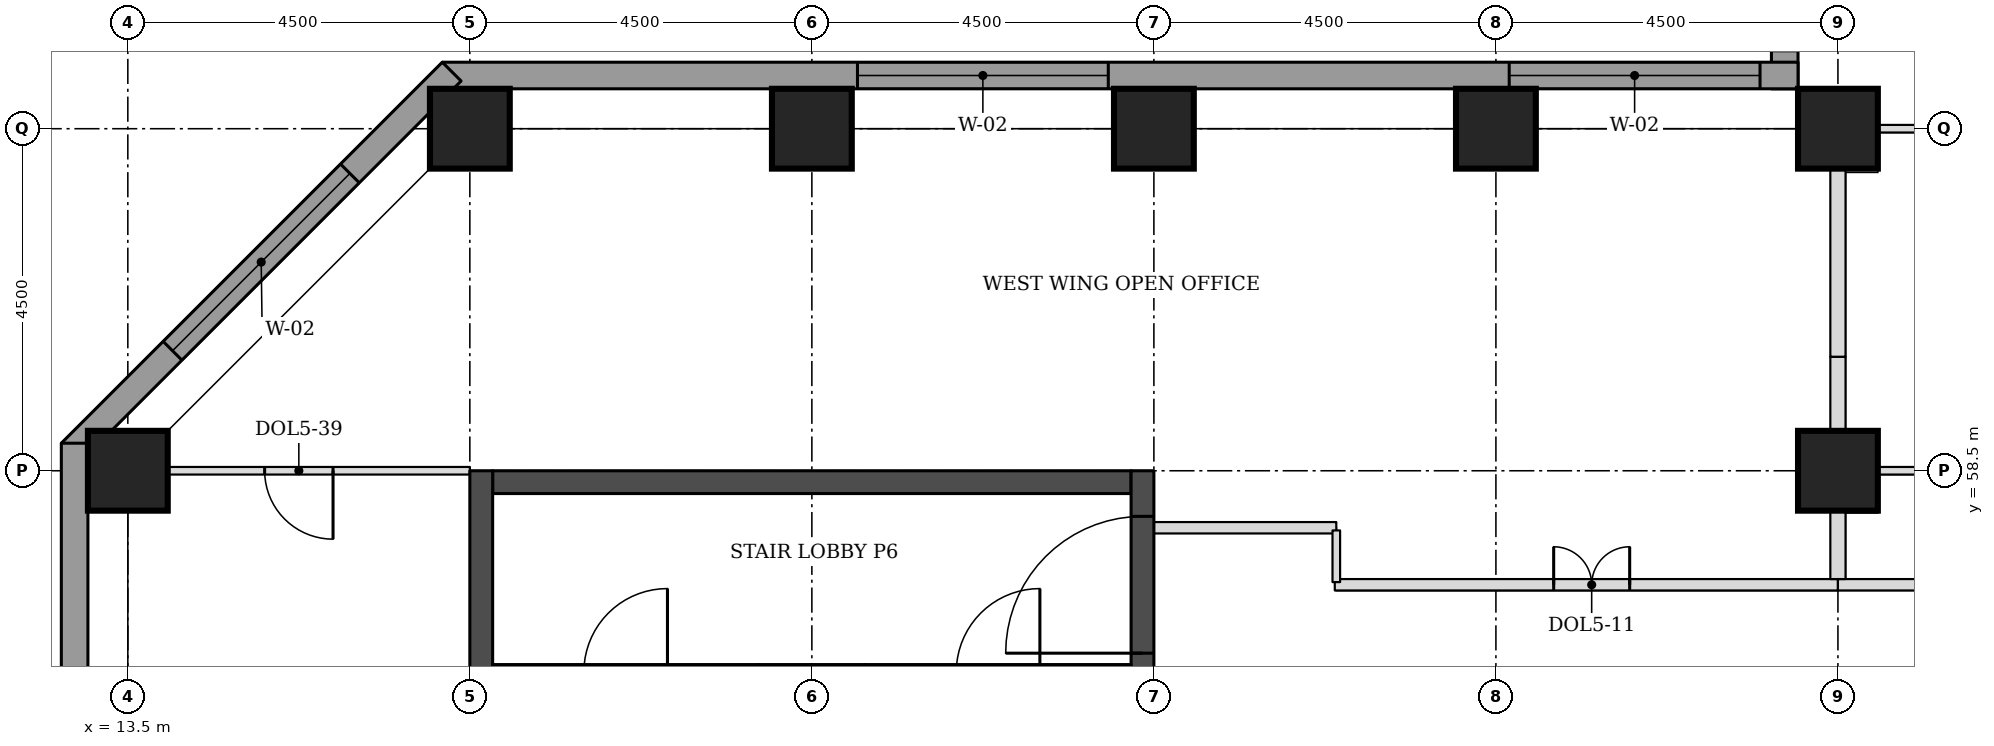
"""IFC4 building model, lengths in metres.
Left out: names, types, materials, properties, quantities, classifications, styles, units other than length and angle.
Written with IfcOpenShell. Run it as: python <this file> out.ifc"""

import sys

from ifc_helpers import new_model, si_unit, direction, frame, frame_2d, origin, origin_2d, place, context, subcontext, project, spatial, rectangle, extrude, element, fill, save


model = new_model("IFC4")
c1 = context("Model", 3, precision=1e-05, world=origin(), true_north=direction((0.0, 1.0)))
c2 = subcontext(c1, "Body", "Model", "MODEL_VIEW")
j1 = project(units=[si_unit("LENGTHUNIT", "METRE"), si_unit("PLANEANGLEUNIT", "RADIAN")], contexts=[c1])
p1 = place(None, origin())
s1 = spatial("IfcSite", under=j1, at=p1, CompositionType="ELEMENT")
p2 = place(p1, origin())
s2 = spatial("IfcBuilding", under=s1, at=p2, CompositionType="ELEMENT")
p3 = place(p2, frame((0.0, 0.0, 112.2)))
s3 = spatial("IfcBuildingStorey", under=s2, at=p3, CompositionType="ELEMENT", Elevation=112.2)
for number, where, z_axis, x_axis in (
    (1, (13.5, 58.5, 0.0), (0.0, 0.0, 1.0), (1.0, 0.0, 0.0)),
    (2, (36.0, 58.5, 0.0), (0.0, 0.0, 1.0), (1.0, 0.0, 0.0)),
    (3, (18.0, 63.0, 0.0), (0.0, 0.0, 1.0), (1.0, 0.0, 0.0)),
    (4, (22.5, 63.0, 0.0), (0.0, 0.0, 1.0), (1.0, 0.0, 0.0)),
    (5, (27.0, 63.0, 0.0), (0.0, 0.0, 1.0), (1.0, 0.0, 0.0)),
    (6, (31.5, 63.0, 0.0), (0.0, 0.0, 1.0), (1.0, 0.0, 0.0)),
    (7, (36.0, 63.0, 0.0), (0.0, 0.0, 1.0), (1.0, 0.0, 0.0)),
):
    element("IfcColumn", number, at=place(p3, frame(where, z_axis=z_axis, x_axis=x_axis)), inside=s3, PredefinedType="COLUMN", context=c2, shape_type="SweptSolid", body=[
        extrude(rectangle(XDim=1.05, YDim=1.05, at=origin_2d()), origin(), (0.0, 0.0, 1.0), 3.7),
    ])
p4 = place(p3, frame((18.3, 58.35, 0.0), z_axis=(0.0, 0.0, 1.0), x_axis=(1.0, 0.0, 0.0)))
e8 = element("IfcWall", 8, at=p4, inside=s3, PredefinedType="SHEAR", context=c2, shape_type="SweptSolid", body=[
    extrude(rectangle(XDim=8.4, YDim=0.3, at=frame_2d((4.2, 0.0))), origin(), (0.0, 0.0, 1.0), 3.7),
])
p5 = place(p3, frame((18.15, 49.5, 0.0), z_axis=(0.0, 0.0, 1.0), x_axis=(0.0, 1.0, 0.0)))
e9 = element("IfcWall", 9, at=p5, inside=s3, PredefinedType="SHEAR", context=c2, shape_type="SweptSolid", body=[
    extrude(rectangle(XDim=9.0, YDim=0.3, at=frame_2d((4.5, 0.0))), origin(), (0.0, 0.0, 1.0), 3.7),
])
p6 = place(p3, frame((26.85, 49.5, 0.0), z_axis=(0.0, 0.0, 1.0), x_axis=(0.0, 1.0, 0.0)))
e10 = element("IfcWall", 10, at=p6, inside=s3, PredefinedType="SHEAR", context=c2, shape_type="SweptSolid", body=[
    extrude(rectangle(XDim=9.0, YDim=0.3, at=frame_2d((4.5, 0.0))), origin(), (0.0, 0.0, 1.0), 3.7),
])
p7 = place(p6, frame((6.6, 0.0, 0.0)))
e11 = element("IfcOpeningElement", 11, at=p7, cuts=e10, PredefinedType="OPENING", context=c2, shape_type="SweptSolid", body=[
    extrude(rectangle(XDim=1.8, YDim=2.1, at=frame_2d((0.9, 1.05))), frame((0.0, 0.16, 0.0), z_axis=(0.0, -1.0, 0.0), x_axis=(1.0, 0.0, 0.0)), (0.0, 0.0, 1.0), 0.32),
])
p8 = place(p3, frame((35.3, 76.862, 0.0), z_axis=(0.0, 0.0, 1.0), x_axis=(0.0, -1.0, 0.0)))
e12 = element("IfcWall", 12, at=p8, inside=s3, PredefinedType="STANDARD", context=c2, shape_type="SweptSolid", body=[
    extrude(rectangle(XDim=13.337, YDim=0.35, at=frame_2d((6.669, 0.0))), origin(), (0.0, 0.0, 1.0), 3.525),
])
p9 = place(p8, frame((9.537, 0.0, 0.9)))
e13 = element("IfcOpeningElement", 13, at=p9, cuts=e12, PredefinedType="OPENING", context=c2, shape_type="SweptSolid", body=[
    extrude(rectangle(XDim=3.3, YDim=1.9, at=frame_2d((1.65, 0.95))), frame((0.0, 0.185, 0.0), z_axis=(0.0, -1.0, 0.0), x_axis=(1.0, 0.0, 0.0)), (0.0, 0.0, 1.0), 0.37),
])
p10 = place(p3, frame((35.475, 63.7, 0.0), z_axis=(0.0, 0.0, 1.0), x_axis=(-1.0, 0.0, 0.0)))
e14 = element("IfcWall", 14, at=p10, inside=s3, PredefinedType="STANDARD", context=c2, shape_type="SweptSolid", body=[
    extrude(rectangle(XDim=17.837, YDim=0.35, at=frame_2d((8.919, 0.0))), origin(), (0.0, 0.0, 1.0), 3.525),
])
p11 = place(p10, frame((0.5, 0.0, 0.9)))
e15 = element("IfcOpeningElement", 15, at=p11, cuts=e14, PredefinedType="OPENING", context=c2, shape_type="SweptSolid", body=[
    extrude(rectangle(XDim=3.3, YDim=1.9, at=frame_2d((1.65, 0.95))), frame((0.0, 0.185, 0.0), z_axis=(0.0, -1.0, 0.0), x_axis=(1.0, 0.0, 0.0)), (0.0, 0.0, 1.0), 0.37),
])
p12 = place(p10, frame((9.075, 0.0, 0.9)))
e16 = element("IfcOpeningElement", 16, at=p12, cuts=e14, PredefinedType="OPENING", context=c2, shape_type="SweptSolid", body=[
    extrude(rectangle(XDim=3.3, YDim=1.9, at=frame_2d((1.65, 0.95))), frame((0.0, 0.185, 0.0), z_axis=(0.0, -1.0, 0.0), x_axis=(1.0, 0.0, 0.0)), (0.0, 0.0, 1.0), 0.37),
])
p13 = place(p3, frame((17.761, 63.751, 0.0), z_axis=(0.0, 0.0, 1.0), x_axis=(-0.707106781187, -0.707106781187, 0.0)))
e17 = element("IfcWall", 17, at=p13, inside=s3, PredefinedType="STANDARD", context=c2, shape_type="SweptSolid", body=[
    extrude(rectangle(XDim=7.089, YDim=0.35, at=frame_2d((3.544, 0.0))), origin(), (0.0, 0.0, 1.0), 3.525),
])
p14 = place(p13, frame((1.894, 0.0, 0.9)))
e18 = element("IfcOpeningElement", 18, at=p14, cuts=e17, PredefinedType="OPENING", context=c2, shape_type="SweptSolid", body=[
    extrude(rectangle(XDim=3.3, YDim=1.9, at=frame_2d((1.65, 0.95))), frame((0.0, 0.185, 0.0), z_axis=(0.0, -1.0, 0.0), x_axis=(1.0, 0.0, 0.0)), (0.0, 0.0, 1.0), 0.37),
])
p15 = place(p3, frame((12.8, 58.862, 0.0), z_axis=(0.0, 0.0, 1.0), x_axis=(0.0, -1.0, 0.0)))
e19 = element("IfcWall", 19, at=p15, inside=s3, PredefinedType="STANDARD", context=c2, shape_type="SweptSolid", body=[
    extrude(rectangle(XDim=14.225, YDim=0.35, at=frame_2d((7.112, 0.0))), origin(), (0.0, 0.0, 1.0), 3.525),
])
p16 = place(p15, frame((5.462, 0.0, 0.9)))
e20 = element("IfcOpeningElement", 20, at=p16, cuts=e19, PredefinedType="OPENING", context=c2, shape_type="SweptSolid", body=[
    extrude(rectangle(XDim=3.3, YDim=1.9, at=frame_2d((1.65, 0.95))), frame((0.0, 0.185, 0.0), z_axis=(0.0, -1.0, 0.0), x_axis=(1.0, 0.0, 0.0)), (0.0, 0.0, 1.0), 0.37),
])
p17 = place(p3, frame((29.38, 57.0, 0.0), z_axis=(0.0, 0.0, 1.0), x_axis=(1.0, 0.0, 0.0)))
e21 = element("IfcWall", 21, at=p17, inside=s3, PredefinedType="PARTITIONING", context=c2, shape_type="SweptSolid", body=[
    extrude(rectangle(XDim=6.62, YDim=0.15, at=frame_2d((3.31, 0.0))), origin(), (0.0, 0.0, 1.0), 3.55),
])
p18 = place(p17, frame((2.88, 0.0, 0.0)))
e22 = element("IfcOpeningElement", 22, at=p18, cuts=e21, PredefinedType="OPENING", context=c2, shape_type="SweptSolid", body=[
    extrude(rectangle(XDim=1.0, YDim=2.1, at=frame_2d((0.5, 1.05))), frame((0.0, 0.085, 0.0), z_axis=(0.0, -1.0, 0.0), x_axis=(1.0, 0.0, 0.0)), (0.0, 0.0, 1.0), 0.17),
])
p19 = place(p3, frame((36.0, 57.0, 0.0), z_axis=(0.0, 0.0, 1.0), x_axis=(1.0, 0.0, 0.0)))
e23 = element("IfcWall", 23, at=p19, inside=s3, PredefinedType="PARTITIONING", context=c2, shape_type="SweptSolid", body=[
    extrude(rectangle(XDim=6.075, YDim=0.15, at=frame_2d((3.038, 0.0))), origin(), (0.0, 0.0, 1.0), 3.55),
])
p20 = place(p19, frame((2.55, 0.0, 0.0)))
e24 = element("IfcOpeningElement", 24, at=p20, cuts=e23, PredefinedType="OPENING", context=c2, shape_type="SweptSolid", body=[
    extrude(rectangle(XDim=1.0, YDim=2.1, at=frame_2d((0.5, 1.05))), frame((0.0, 0.085, 0.0), z_axis=(0.0, -1.0, 0.0), x_axis=(1.0, 0.0, 0.0)), (0.0, 0.0, 1.0), 0.17),
])
p21 = place(p3, frame((36.525, 58.5, 0.0), z_axis=(0.0, 0.0, 1.0), x_axis=(1.0, 0.0, 0.0)))
e25 = element("IfcWall", 25, at=p21, inside=s3, PredefinedType="PARTITIONING", context=c2, shape_type="SweptSolid", body=[
    extrude(rectangle(XDim=2.525, YDim=0.1, at=frame_2d((1.263, 0.0))), origin(), (0.0, 0.0, 1.0), 3.55),
])
p22 = place(p21, frame((0.8, 0.0, 0.0)))
e26 = element("IfcOpeningElement", 26, at=p22, cuts=e25, PredefinedType="OPENING", context=c2, shape_type="SweptSolid", body=[
    extrude(rectangle(XDim=0.9, YDim=2.1, at=frame_2d((0.45, 1.05))), frame((0.0, 0.06, 0.0), z_axis=(0.0, -1.0, 0.0), x_axis=(1.0, 0.0, 0.0)), (0.0, 0.0, 1.0), 0.12),
])
p23 = place(p3, frame((36.525, 63.0, 0.0), z_axis=(0.0, 0.0, 1.0), x_axis=(1.0, 0.0, 0.0)))
e27 = element("IfcWall", 27, at=p23, inside=s3, PredefinedType="PARTITIONING", context=c2, shape_type="SweptSolid", body=[
    extrude(rectangle(XDim=2.425, YDim=0.1, at=frame_2d((1.212, 0.0))), origin(), (0.0, 0.0, 1.0), 3.55),
])
p24 = place(p3, frame((36.0, 57.075, 0.0), z_axis=(0.0, 0.0, 1.0), x_axis=(0.0, 1.0, 0.0)))
e28 = element("IfcWall", 28, at=p24, inside=s3, PredefinedType="PARTITIONING", context=c2, shape_type="SweptSolid", body=[
    extrude(rectangle(XDim=0.9, YDim=0.2, at=frame_2d((0.45, 0.0))), origin(), (0.0, 0.0, 1.0), 2.8),
])
p25 = place(p3, frame((36.0, 58.995, 0.0), z_axis=(0.0, 0.0, 1.0), x_axis=(0.0, 1.0, 0.0)))
e29 = element("IfcWall", 29, at=p25, inside=s3, PredefinedType="PARTITIONING", context=c2, shape_type="SweptSolid", body=[
    extrude(rectangle(XDim=1.005, YDim=0.2, at=frame_2d((0.502, 0.0))), origin(), (0.0, 0.0, 1.0), 2.8),
])
p26 = place(p3, frame((36.0, 60.0, 0.0), z_axis=(0.0, 0.0, 1.0), x_axis=(0.0, 1.0, 0.0)))
e30 = element("IfcWall", 30, at=p26, inside=s3, PredefinedType="PARTITIONING", context=c2, shape_type="SweptSolid", body=[
    extrude(rectangle(XDim=2.475, YDim=0.2, at=frame_2d((1.238, 0.0))), origin(), (0.0, 0.0, 1.0), 2.8),
])
p27 = place(p3, frame((13.5, 58.5, 0.0), z_axis=(0.0, 0.0, 1.0), x_axis=(1.0, 0.0, 0.0)))
e31 = element("IfcWall", 31, at=p27, inside=s3, PredefinedType="PARTITIONING", context=c2, shape_type="SweptSolid", body=[
    extrude(rectangle(XDim=4.5, YDim=0.1, at=frame_2d((2.25, 0.0))), origin(), (0.0, 0.0, 1.0), 2.55),
])
p28 = place(p27, frame((1.8, 0.0, 0.0)))
e32 = element("IfcOpeningElement", 32, at=p28, cuts=e31, PredefinedType="OPENING", context=c2, shape_type="SweptSolid", body=[
    extrude(rectangle(XDim=0.9, YDim=2.1, at=frame_2d((0.45, 1.05))), frame((0.0, 0.06, 0.0), z_axis=(0.0, -1.0, 0.0), x_axis=(1.0, 0.0, 0.0)), (0.0, 0.0, 1.0), 0.12),
])
p29 = place(p3, frame((27.0, 57.75, 0.0), z_axis=(0.0, 0.0, 1.0), x_axis=(1.0, 0.0, 0.0)))
e33 = element("IfcWall", 33, at=p29, inside=s3, PredefinedType="PARTITIONING", context=c2, shape_type="SweptSolid", body=[
    extrude(rectangle(XDim=2.4, YDim=0.15, at=frame_2d((1.2, 0.0))), origin(), (0.0, 0.0, 1.0), 3.55),
])
p30 = place(p3, frame((29.4, 57.715, 0.0), z_axis=(0.0, 0.0, 1.0), x_axis=(0.0, -1.0, 0.0)))
e34 = element("IfcWall", 34, at=p30, inside=s3, PredefinedType="PARTITIONING", context=c2, shape_type="SweptSolid", body=[
    extrude(rectangle(XDim=0.68, YDim=0.1, at=frame_2d((0.34, 0.0))), origin(), (0.0, 0.0, 1.0), 3.55),
])
p31 = place(p3, frame((21.8, 55.85, 0.0), z_axis=(0.0, 0.0, 1.0), x_axis=(1.0, 0.0, 0.0)))
e35 = element("IfcWall", 35, at=p31, inside=s3, PredefinedType="SOLIDWALL", context=c2, shape_type="SweptSolid", body=[
    extrude(rectangle(XDim=1.4, YDim=0.2, at=frame_2d((0.7, 0.0))), origin(), (0.0, 0.0, 1.0), 3.55),
])
p32 = place(p3, frame((18.3, 55.85, 0.0), z_axis=(0.0, 0.0, 1.0), x_axis=(1.0, 0.0, 0.0)))
e36 = element("IfcWall", 36, at=p32, inside=s3, PredefinedType="SOLIDWALL", context=c2, shape_type="SweptSolid", body=[
    extrude(rectangle(XDim=3.5, YDim=0.2, at=frame_2d((1.75, 0.0))), origin(), (0.0, 0.0, 1.0), 3.55),
])
p33 = place(p32, frame((1.2, 0.0, 0.0)))
e37 = element("IfcOpeningElement", 37, at=p33, cuts=e36, PredefinedType="OPENING", context=c2, shape_type="SweptSolid", body=[
    extrude(rectangle(XDim=1.1, YDim=2.1, at=frame_2d((0.55, 1.05))), frame((0.0, 0.11, 0.0), z_axis=(0.0, -1.0, 0.0), x_axis=(1.0, 0.0, 0.0)), (0.0, 0.0, 1.0), 0.22),
])
p34 = place(p3, frame((23.2, 55.85, 0.0), z_axis=(0.0, 0.0, 1.0), x_axis=(1.0, 0.0, 0.0)))
e38 = element("IfcWall", 38, at=p34, inside=s3, PredefinedType="SOLIDWALL", context=c2, shape_type="SweptSolid", body=[
    extrude(rectangle(XDim=3.5, YDim=0.2, at=frame_2d((1.75, 0.0))), origin(), (0.0, 0.0, 1.0), 3.55),
])
p35 = place(p34, frame((1.2, 0.0, 0.0)))
e39 = element("IfcOpeningElement", 39, at=p35, cuts=e38, PredefinedType="OPENING", context=c2, shape_type="SweptSolid", body=[
    extrude(rectangle(XDim=1.1, YDim=2.1, at=frame_2d((0.55, 1.05))), frame((0.0, 0.11, 0.0), z_axis=(0.0, -1.0, 0.0), x_axis=(1.0, 0.0, 0.0)), (0.0, 0.0, 1.0), 0.22),
])
p36 = place(p11, origin())
e40 = element("IfcWindow", 40, at=p36, inside=s3, PartitioningType="SINGLE_PANEL", PredefinedType="WINDOW", context=c2, shape_type="SweptSolid", body=[
    extrude(rectangle(XDim=3.3, YDim=1.9, at=frame_2d((1.65, 0.95))), frame((0.0, 0.085, 0.0), z_axis=(0.0, -1.0, 0.0), x_axis=(1.0, 0.0, 0.0)), (0.0, 0.0, 1.0), 0.06),
])
fill(e15, e40)
p37 = place(p12, origin())
e41 = element("IfcWindow", 41, at=p37, inside=s3, PartitioningType="SINGLE_PANEL", PredefinedType="WINDOW", context=c2, shape_type="SweptSolid", body=[
    extrude(rectangle(XDim=3.3, YDim=1.9, at=frame_2d((1.65, 0.95))), frame((0.0, 0.085, 0.0), z_axis=(0.0, -1.0, 0.0), x_axis=(1.0, 0.0, 0.0)), (0.0, 0.0, 1.0), 0.06),
])
fill(e16, e41)
p38 = place(p14, origin())
e42 = element("IfcWindow", 42, at=p38, inside=s3, PartitioningType="SINGLE_PANEL", PredefinedType="WINDOW", context=c2, shape_type="SweptSolid", body=[
    extrude(rectangle(XDim=3.3, YDim=1.9, at=frame_2d((1.65, 0.95))), frame((0.0, 0.085, 0.0), z_axis=(0.0, -1.0, 0.0), x_axis=(1.0, 0.0, 0.0)), (0.0, 0.0, 1.0), 0.06),
])
fill(e18, e42)
p39 = place(p18, origin())
e43 = element("IfcDoor", 43, at=p39, inside=s3, OperationType="DOUBLE_DOOR_SINGLE_SWING", PredefinedType="DOOR", context=c2, shape_type="SweptSolid", body=[
    extrude(rectangle(XDim=1.0, YDim=2.1, at=frame_2d((0.5, 1.05))), frame((0.0, 0.025, 0.0), z_axis=(0.0, -1.0, 0.0), x_axis=(1.0, 0.0, 0.0)), (0.0, 0.0, 1.0), 0.05),
])
fill(e22, e43)
p40 = place(p28, frame((0.9, 0.0, 0.0), z_axis=(0.0, 0.0, 1.0), x_axis=(-1.0, 0.0, 0.0)))
e44 = element("IfcDoor", 44, at=p40, inside=s3, OperationType="SINGLE_SWING_LEFT", PredefinedType="DOOR", context=c2, shape_type="SweptSolid", body=[
    extrude(rectangle(XDim=0.9, YDim=2.1, at=frame_2d((0.45, 1.05))), frame((0.0, 0.025, 0.0), z_axis=(0.0, -1.0, 0.0), x_axis=(1.0, 0.0, 0.0)), (0.0, 0.0, 1.0), 0.05),
])
fill(e32, e44)
p41 = place(p7, origin())
e45 = element("IfcDoor", 45, at=p41, inside=s3, OperationType="SINGLE_SWING_LEFT", PredefinedType="DOOR", context=c2, shape_type="SweptSolid", body=[
    extrude(rectangle(XDim=1.8, YDim=2.1, at=frame_2d((0.9, 1.05))), frame((0.0, 0.025, 0.0), z_axis=(0.0, -1.0, 0.0), x_axis=(1.0, 0.0, 0.0)), (0.0, 0.0, 1.0), 0.05),
])
fill(e11, e45)
save(model, sys.argv[1])
